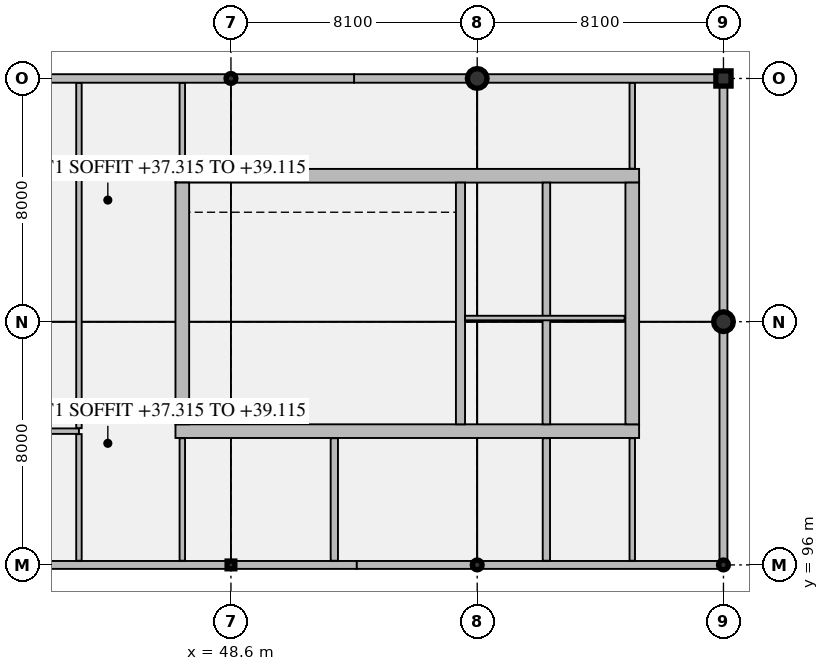
"""IFC4 building model, lengths in metres.
Left out: names, types, materials, properties, quantities, classifications, styles, units other than length and angle.
Written with IfcOpenShell. Run it as: python <this file> out.ifc"""

import sys

from ifc_helpers import new_model, si_unit, direction, frame, frame_2d, origin, origin_2d, place, context, subcontext, project, spatial, rectangle, hollow_rectangle, circle, hollow_circle, extrude, element, fill, save


model = new_model("IFC4")
c1 = context("Model", 3, precision=1e-05, world=origin(), true_north=direction((0.0, 1.0)))
c2 = subcontext(c1, "Body", "Model", "MODEL_VIEW")
j1 = project(units=[si_unit("LENGTHUNIT", "METRE"), si_unit("PLANEANGLEUNIT", "RADIAN")], contexts=[c1])
p1 = place(None, origin())
s1 = spatial("IfcSite", under=j1, at=p1, CompositionType="ELEMENT")
p2 = place(p1, origin())
s2 = spatial("IfcBuilding", under=s1, at=p2, CompositionType="ELEMENT")
p3 = place(p2, frame((0.0, 0.0, 33.3)))
s3 = spatial("IfcBuildingStorey", under=s2, at=p3, CompositionType="ELEMENT", Elevation=33.3)
p4 = place(p3, frame((46.775, 100.4, 0.0), z_axis=(0.0, 0.0, 1.0), x_axis=(1.0, 0.0, 0.0)))
e1 = element("IfcWall", 1, at=p4, inside=s3, PredefinedType="SHEAR", context=c2, shape_type="SweptSolid", body=[
    extrude(rectangle(XDim=15.25, YDim=0.45, at=frame_2d((7.625, 0.0))), origin(), (0.0, 0.0, 1.0), 3.98),
])
p5 = place(p4, frame((0.975, 0.0, 0.0)))
e2 = element("IfcOpeningElement", 2, at=p5, cuts=e1, PredefinedType="OPENING", context=c2, shape_type="SweptSolid", body=[
    extrude(rectangle(XDim=1.15, YDim=2.25, at=frame_2d((0.575, 1.125))), frame((0.0, 0.235, 0.0), z_axis=(0.0, -1.0, 0.0), x_axis=(1.0, 0.0, 0.0)), (0.0, 0.0, 1.0), 0.47),
])
p6 = place(p4, frame((10.258, 0.0, 0.0)))
e3 = element("IfcOpeningElement", 3, at=p6, cuts=e1, PredefinedType="OPENING", context=c2, shape_type="SweptSolid", body=[
    extrude(rectangle(XDim=1.1, YDim=2.2, at=frame_2d((0.55, 1.1))), frame((0.0, 0.235, 0.0), z_axis=(0.0, -1.0, 0.0), x_axis=(1.0, 0.0, 0.0)), (0.0, 0.0, 1.0), 0.47),
])
p7 = place(p3, frame((46.775, 108.8, 0.0), z_axis=(0.0, 0.0, 1.0), x_axis=(1.0, 0.0, 0.0)))
e4 = element("IfcWall", 4, at=p7, inside=s3, PredefinedType="SHEAR", context=c2, shape_type="SweptSolid", body=[
    extrude(rectangle(XDim=15.25, YDim=0.45, at=frame_2d((7.625, 0.0))), origin(), (0.0, 0.0, 1.0), 3.98),
])
for number, where, z_axis, x_axis in (
    (5, (47.0, 100.625, 0.0), (0.0, 0.0, 1.0), (0.0, 1.0, 0.0)),
    (6, (61.8, 100.625, 0.0), (0.0, 0.0, 1.0), (0.0, 1.0, 0.0)),
):
    element("IfcWall", number, at=place(p3, frame(where, z_axis=z_axis, x_axis=x_axis)), inside=s3, PredefinedType="SHEAR", context=c2, shape_type="SweptSolid", body=[
        extrude(rectangle(XDim=7.95, YDim=0.45, at=frame_2d((3.975, 0.0))), origin(), (0.0, 0.0, 1.0), 3.98),
    ])
p8 = place(p3, frame((56.15, 100.625, 0.0), z_axis=(0.0, 0.0, 1.0), x_axis=(0.0, 1.0, 0.0)))
e7 = element("IfcWall", 7, at=p8, inside=s3, PredefinedType="SHEAR", context=c2, shape_type="SweptSolid", body=[
    extrude(rectangle(XDim=7.95, YDim=0.3, at=frame_2d((3.975, 0.0))), origin(), (0.0, 0.0, 1.0), 3.98),
])
p9 = place(p3, frame((58.975, 100.625, 0.0), z_axis=(0.0, 0.0, 1.0), x_axis=(0.0, 1.0, 0.0)))
e8 = element("IfcWall", 8, at=p9, inside=s3, PredefinedType="SHEAR", context=c2, shape_type="SweptSolid", body=[
    extrude(rectangle(XDim=7.95, YDim=0.25, at=frame_2d((3.975, 0.0))), origin(), (0.0, 0.0, 1.0), 3.98),
])
p10 = place(p3, frame((48.6, 96.0, 0.0), z_axis=(0.0, 0.0, 1.0), x_axis=(1.0, 0.0, 0.0)))
e9 = element("IfcColumn", 9, at=p10, inside=s3, PredefinedType="COLUMN", context=c2, shape_type="SweptSolid", body=[
    extrude(hollow_rectangle(XDim=0.254, YDim=0.254, WallThickness=0.013, InnerFilletRadius=0.013, OuterFilletRadius=0.025, at=origin_2d()), origin(), (0.0, 0.0, 1.0), 3.98),
])
for number, where, z_axis, x_axis in (
    (10, (48.6, 112.0, 0.0), (0.0, 0.0, 1.0), (1.0, 0.0, 0.0)),
    (11, (56.7, 96.0, 0.0), (0.0, 0.0, 1.0), (1.0, 0.0, 0.0)),
):
    element("IfcColumn", number, at=place(p3, frame(where, z_axis=z_axis, x_axis=x_axis)), inside=s3, PredefinedType="COLUMN", context=c2, shape_type="SweptSolid", body=[
        extrude(hollow_circle(Radius=0.162, WallThickness=0.013, at=origin_2d()), origin(), (0.0, 0.0, 1.0), 3.98),
    ])
p11 = place(p3, frame((56.7, 112.0, 0.0), z_axis=(0.0, 0.0, 1.0), x_axis=(1.0, 0.0, 0.0)))
e12 = element("IfcColumn", 12, at=p11, inside=s3, PredefinedType="COLUMN", context=c2, shape_type="SweptSolid", body=[
    extrude(circle(Radius=0.325, at=origin_2d()), origin(), (0.0, 0.0, 1.0), 3.98),
])
p12 = place(p3, frame((64.8, 96.0, 0.0), z_axis=(0.0, 0.0, 1.0), x_axis=(1.0, 0.0, 0.0)))
e13 = element("IfcColumn", 13, at=p12, inside=s3, PredefinedType="COLUMN", context=c2, shape_type="SweptSolid", body=[
    extrude(hollow_circle(Radius=0.162, WallThickness=0.013, at=origin_2d()), origin(), (0.0, 0.0, 1.0), 3.98),
])
p13 = place(p3, frame((64.8, 104.0, 0.0), z_axis=(0.0, 0.0, 1.0), x_axis=(1.0, 0.0, 0.0)))
e14 = element("IfcColumn", 14, at=p13, inside=s3, PredefinedType="COLUMN", context=c2, shape_type="SweptSolid", body=[
    extrude(circle(Radius=0.325, at=origin_2d()), origin(), (0.0, 0.0, 1.0), 3.98),
])
p14 = place(p3, frame((64.8, 112.0, 0.0), z_axis=(0.0, 0.0, 1.0), x_axis=(1.0, 0.0, 0.0)))
e15 = element("IfcColumn", 15, at=p14, inside=s3, PredefinedType="COLUMN", context=c2, shape_type="SweptSolid", body=[
    extrude(rectangle(XDim=0.5, YDim=0.5, at=origin_2d()), origin(), (0.0, 0.0, 1.0), 3.98),
])
p15 = place(p3, frame((40.68, 96.0, 0.0), z_axis=(0.0, 0.0, 1.0), x_axis=(1.0, 0.0, 0.0)))
e16 = element("IfcWall", 16, at=p15, inside=s3, PredefinedType="SOLIDWALL", context=c2, shape_type="SweptSolid", body=[
    extrude(rectangle(XDim=12.06, YDim=0.26, at=frame_2d((6.03, 0.0))), origin(), (0.0, 0.0, 1.0), 3.655),
])
p16 = place(p15, frame((3.6, 0.0, 0.95)))
e17 = element("IfcOpeningElement", 17, at=p16, cuts=e16, PredefinedType="OPENING", context=c2, shape_type="SweptSolid", body=[
    extrude(rectangle(XDim=1.2, YDim=1.8, at=frame_2d((0.6, 0.9))), frame((0.0, 0.14, 0.0), z_axis=(0.0, -1.0, 0.0), x_axis=(1.0, 0.0, 0.0)), (0.0, 0.0, 1.0), 0.28),
])
p17 = place(p3, frame((52.74, 96.0, 0.0), z_axis=(0.0, 0.0, 1.0), x_axis=(1.0, 0.0, 0.0)))
e18 = element("IfcWall", 18, at=p17, inside=s3, PredefinedType="SOLIDWALL", context=c2, shape_type="SweptSolid", body=[
    extrude(rectangle(XDim=12.06, YDim=0.26, at=frame_2d((6.03, 0.0))), origin(), (0.0, 0.0, 1.0), 3.655),
])
p18 = place(p3, frame((64.8, 96.0, 0.0), z_axis=(0.0, 0.0, 1.0), x_axis=(0.0, 1.0, 0.0)))
e19 = element("IfcWall", 19, at=p18, inside=s3, PredefinedType="SOLIDWALL", context=c2, shape_type="SweptSolid", body=[
    extrude(rectangle(XDim=16.0, YDim=0.26, at=frame_2d((8.0, 0.0))), origin(), (0.0, 0.0, 1.0), 3.655),
])
p19 = place(p18, frame((11.25, 0.0, 0.0)))
e20 = element("IfcOpeningElement", 20, at=p19, cuts=e19, PredefinedType="OPENING", context=c2, shape_type="SweptSolid", body=[
    extrude(rectangle(XDim=1.5, YDim=2.3, at=frame_2d((0.75, 1.15))), frame((0.0, 0.14, 0.0), z_axis=(0.0, -1.0, 0.0), x_axis=(1.0, 0.0, 0.0)), (0.0, 0.0, 1.0), 0.28),
])
p20 = place(p3, frame((64.8, 112.0, 0.0), z_axis=(0.0, 0.0, 1.0), x_axis=(-1.0, 0.0, 0.0)))
e21 = element("IfcWall", 21, at=p20, inside=s3, PredefinedType="SOLIDWALL", context=c2, shape_type="SweptSolid", body=[
    extrude(rectangle(XDim=12.15, YDim=0.28, at=frame_2d((6.075, 0.0))), origin(), (0.0, 0.0, 1.0), 3.655),
])
p21 = place(p20, frame((5.4, 0.0, 0.95)))
e22 = element("IfcOpeningElement", 22, at=p21, cuts=e21, PredefinedType="OPENING", context=c2, shape_type="SweptSolid", body=[
    extrude(rectangle(XDim=1.35, YDim=1.8, at=frame_2d((0.675, 0.9))), frame((0.0, 0.15, 0.0), z_axis=(0.0, -1.0, 0.0), x_axis=(1.0, 0.0, 0.0)), (0.0, 0.0, 1.0), 0.3),
])
p22 = place(p3, frame((52.65, 112.0, 0.0), z_axis=(0.0, 0.0, 1.0), x_axis=(-1.0, 0.0, 0.0)))
e23 = element("IfcWall", 23, at=p22, inside=s3, PredefinedType="SOLIDWALL", context=c2, shape_type="SweptSolid", body=[
    extrude(rectangle(XDim=12.15, YDim=0.28, at=frame_2d((6.075, 0.0))), origin(), (0.0, 0.0, 1.0), 3.655),
])
p23 = place(p3, frame((56.3, 104.12, 0.0), z_axis=(0.0, 0.0, 1.0), x_axis=(1.0, 0.0, 0.0)))
e24 = element("IfcWall", 24, at=p23, inside=s3, PredefinedType="PARTITIONING", context=c2, shape_type="SweptSolid", body=[
    extrude(rectangle(XDim=5.25, YDim=0.15, at=frame_2d((2.625, 0.0))), origin(), (0.0, 0.0, 1.0), 3.98),
])
p24 = place(p3, frame((39.6, 100.4, 0.0), z_axis=(0.0, 0.0, 1.0), x_axis=(1.0, 0.0, 0.0)))
e25 = element("IfcWall", 25, at=p24, inside=s3, PredefinedType="PARTITIONING", context=c2, shape_type="SweptSolid", body=[
    extrude(rectangle(XDim=4.0, YDim=0.18, at=frame_2d((2.0, 0.0))), origin(), (0.0, 0.0, 1.0), 3.98),
])
p25 = place(p3, frame((43.6, 96.138, 0.0), z_axis=(0.0, 0.0, 1.0), x_axis=(0.0, 1.0, 0.0)))
e26 = element("IfcWall", 26, at=p25, inside=s3, PredefinedType="PARTITIONING", context=c2, shape_type="SweptSolid", body=[
    extrude(rectangle(XDim=4.164, YDim=0.18, at=frame_2d((2.082, 0.0))), origin(), (0.0, 0.0, 1.0), 3.98),
])
p26 = place(p25, frame((1.532, 0.0, 0.0)))
e27 = element("IfcOpeningElement", 27, at=p26, cuts=e26, PredefinedType="OPENING", context=c2, shape_type="SweptSolid", body=[
    extrude(rectangle(XDim=1.1, YDim=2.2, at=frame_2d((0.55, 1.1))), frame((0.0, 0.1, 0.0), z_axis=(0.0, -1.0, 0.0), x_axis=(1.0, 0.0, 0.0)), (0.0, 0.0, 1.0), 0.2),
])
p27 = place(p3, frame((43.6, 100.498, 0.0), z_axis=(0.0, 0.0, 1.0), x_axis=(0.0, 1.0, 0.0)))
e28 = element("IfcWall", 28, at=p27, inside=s3, PredefinedType="PARTITIONING", context=c2, shape_type="SweptSolid", body=[
    extrude(rectangle(XDim=11.354, YDim=0.18, at=frame_2d((5.677, 0.0))), origin(), (0.0, 0.0, 1.0), 3.98),
])
p28 = place(p27, frame((5.127, 0.0, 0.0)))
e29 = element("IfcOpeningElement", 29, at=p28, cuts=e28, PredefinedType="OPENING", context=c2, shape_type="SweptSolid", body=[
    extrude(rectangle(XDim=1.1, YDim=2.2, at=frame_2d((0.55, 1.1))), frame((0.0, 0.1, 0.0), z_axis=(0.0, -1.0, 0.0), x_axis=(1.0, 0.0, 0.0)), (0.0, 0.0, 1.0), 0.2),
])
p29 = place(p3, frame((47.0, 96.138, 0.0), z_axis=(0.0, 0.0, 1.0), x_axis=(0.0, 1.0, 0.0)))
e30 = element("IfcWall", 30, at=p29, inside=s3, PredefinedType="PARTITIONING", context=c2, shape_type="SweptSolid", body=[
    extrude(rectangle(XDim=4.029, YDim=0.18, at=frame_2d((2.015, 0.0))), origin(), (0.0, 0.0, 1.0), 3.98),
])
p30 = place(p29, frame((1.465, 0.0, 0.0)))
e31 = element("IfcOpeningElement", 31, at=p30, cuts=e30, PredefinedType="OPENING", context=c2, shape_type="SweptSolid", body=[
    extrude(rectangle(XDim=1.1, YDim=2.2, at=frame_2d((0.55, 1.1))), frame((0.0, 0.1, 0.0), z_axis=(0.0, -1.0, 0.0), x_axis=(1.0, 0.0, 0.0)), (0.0, 0.0, 1.0), 0.2),
])
p31 = place(p3, frame((47.0, 109.033, 0.0), z_axis=(0.0, 0.0, 1.0), x_axis=(0.0, 1.0, 0.0)))
e32 = element("IfcWall", 32, at=p31, inside=s3, PredefinedType="PARTITIONING", context=c2, shape_type="SweptSolid", body=[
    extrude(rectangle(XDim=2.819, YDim=0.18, at=frame_2d((1.41, 0.0))), origin(), (0.0, 0.0, 1.0), 3.98),
])
p32 = place(p31, frame((0.86, 0.0, 0.0)))
e33 = element("IfcOpeningElement", 33, at=p32, cuts=e32, PredefinedType="OPENING", context=c2, shape_type="SweptSolid", body=[
    extrude(rectangle(XDim=1.1, YDim=2.2, at=frame_2d((0.55, 1.1))), frame((0.0, 0.1, 0.0), z_axis=(0.0, -1.0, 0.0), x_axis=(1.0, 0.0, 0.0)), (0.0, 0.0, 1.0), 0.2),
])
p33 = place(p3, frame((52.0, 96.138, 0.0), z_axis=(0.0, 0.0, 1.0), x_axis=(0.0, 1.0, 0.0)))
e34 = element("IfcWall", 34, at=p33, inside=s3, PredefinedType="PARTITIONING", context=c2, shape_type="SweptSolid", body=[
    extrude(rectangle(XDim=4.029, YDim=0.24, at=frame_2d((2.015, 0.0))), origin(), (0.0, 0.0, 1.0), 3.98),
])
p34 = place(p33, frame((1.415, 0.0, 0.0)))
e35 = element("IfcOpeningElement", 35, at=p34, cuts=e34, PredefinedType="OPENING", context=c2, shape_type="SweptSolid", body=[
    extrude(rectangle(XDim=1.2, YDim=2.3, at=frame_2d((0.6, 1.15))), frame((0.0, 0.13, 0.0), z_axis=(0.0, -1.0, 0.0), x_axis=(1.0, 0.0, 0.0)), (0.0, 0.0, 1.0), 0.26),
])
p35 = place(p3, frame((58.975, 96.138, 0.0), z_axis=(0.0, 0.0, 1.0), x_axis=(0.0, 1.0, 0.0)))
e36 = element("IfcWall", 36, at=p35, inside=s3, PredefinedType="PARTITIONING", context=c2, shape_type="SweptSolid", body=[
    extrude(rectangle(XDim=4.029, YDim=0.24, at=frame_2d((2.015, 0.0))), origin(), (0.0, 0.0, 1.0), 3.98),
])
p36 = place(p3, frame((61.8, 96.138, 0.0), z_axis=(0.0, 0.0, 1.0), x_axis=(0.0, 1.0, 0.0)))
e37 = element("IfcWall", 37, at=p36, inside=s3, PredefinedType="PARTITIONING", context=c2, shape_type="SweptSolid", body=[
    extrude(rectangle(XDim=4.029, YDim=0.18, at=frame_2d((2.015, 0.0))), origin(), (0.0, 0.0, 1.0), 3.98),
])
p37 = place(p36, frame((1.514, 0.0, 0.0)))
e38 = element("IfcOpeningElement", 38, at=p37, cuts=e37, PredefinedType="OPENING", context=c2, shape_type="SweptSolid", body=[
    extrude(rectangle(XDim=1.0, YDim=2.15, at=frame_2d((0.5, 1.075))), frame((0.0, 0.1, 0.0), z_axis=(0.0, -1.0, 0.0), x_axis=(1.0, 0.0, 0.0)), (0.0, 0.0, 1.0), 0.2),
])
p38 = place(p3, frame((61.8, 109.033, 0.0), z_axis=(0.0, 0.0, 1.0), x_axis=(0.0, 1.0, 0.0)))
e39 = element("IfcWall", 39, at=p38, inside=s3, PredefinedType="PARTITIONING", context=c2, shape_type="SweptSolid", body=[
    extrude(rectangle(XDim=2.819, YDim=0.18, at=frame_2d((1.41, 0.0))), origin(), (0.0, 0.0, 1.0), 3.98),
])
p39 = place(p38, frame((0.86, 0.0, 0.0)))
e40 = element("IfcOpeningElement", 40, at=p39, cuts=e39, PredefinedType="OPENING", context=c2, shape_type="SweptSolid", body=[
    extrude(rectangle(XDim=1.1, YDim=2.2, at=frame_2d((0.55, 1.1))), frame((0.0, 0.1, 0.0), z_axis=(0.0, -1.0, 0.0), x_axis=(1.0, 0.0, 0.0)), (0.0, 0.0, 1.0), 0.2),
])
p40 = place(p16, origin())
e41 = element("IfcWindow", 41, at=p40, inside=s3, PartitioningType="SINGLE_PANEL", PredefinedType="WINDOW", context=c2, shape_type="SweptSolid", body=[
    extrude(rectangle(XDim=1.2, YDim=1.8, at=frame_2d((0.6, 0.9))), frame((0.0, 0.03, 0.0), z_axis=(0.0, -1.0, 0.0), x_axis=(1.0, 0.0, 0.0)), (0.0, 0.0, 1.0), 0.06),
])
fill(e17, e41)
p41 = place(p19, frame((1.5, 0.0, 0.0), z_axis=(0.0, 0.0, 1.0), x_axis=(-1.0, 0.0, 0.0)))
e42 = element("IfcDoor", 42, at=p41, inside=s3, OperationType="DOUBLE_DOOR_SINGLE_SWING", PredefinedType="DOOR", context=c2, shape_type="SweptSolid", body=[
    extrude(rectangle(XDim=1.5, YDim=2.3, at=frame_2d((0.75, 1.15))), frame((0.0, 0.025, 0.0), z_axis=(0.0, -1.0, 0.0), x_axis=(1.0, 0.0, 0.0)), (0.0, 0.0, 1.0), 0.05),
])
fill(e20, e42)
p42 = place(p21, origin())
e43 = element("IfcWindow", 43, at=p42, inside=s3, PartitioningType="DOUBLE_PANEL_VERTICAL", PredefinedType="WINDOW", context=c2, shape_type="SweptSolid", body=[
    extrude(rectangle(XDim=1.35, YDim=1.8, at=frame_2d((0.675, 0.9))), frame((0.0, 0.03, 0.0), z_axis=(0.0, -1.0, 0.0), x_axis=(1.0, 0.0, 0.0)), (0.0, 0.0, 1.0), 0.06),
])
fill(e22, e43)
p43 = place(p5, origin())
e44 = element("IfcDoor", 44, at=p43, inside=s3, OperationType="SINGLE_SWING_LEFT", PredefinedType="DOOR", context=c2, shape_type="SweptSolid", body=[
    extrude(rectangle(XDim=1.15, YDim=2.25, at=frame_2d((0.575, 1.125))), frame((0.0, 0.025, 0.0), z_axis=(0.0, -1.0, 0.0), x_axis=(1.0, 0.0, 0.0)), (0.0, 0.0, 1.0), 0.05),
])
fill(e2, e44)
p44 = place(p6, frame((1.1, 0.0, 0.0), z_axis=(0.0, 0.0, 1.0), x_axis=(-1.0, 0.0, 0.0)))
e45 = element("IfcDoor", 45, at=p44, inside=s3, OperationType="DOUBLE_DOOR_SLIDING", PredefinedType="DOOR", context=c2, shape_type="SweptSolid", body=[
    extrude(rectangle(XDim=1.1, YDim=2.2, at=frame_2d((0.55, 1.1))), frame((0.0, 0.025, 0.0), z_axis=(0.0, -1.0, 0.0), x_axis=(1.0, 0.0, 0.0)), (0.0, 0.0, 1.0), 0.05),
])
fill(e3, e45)
p45 = place(p26, origin())
e46 = element("IfcDoor", 46, at=p45, inside=s3, OperationType="SINGLE_SWING_RIGHT", PredefinedType="DOOR", context=c2, shape_type="SweptSolid", body=[
    extrude(rectangle(XDim=1.1, YDim=2.2, at=frame_2d((0.55, 1.1))), frame((0.0, 0.025, 0.0), z_axis=(0.0, -1.0, 0.0), x_axis=(1.0, 0.0, 0.0)), (0.0, 0.0, 1.0), 0.05),
])
fill(e27, e46)
p46 = place(p28, origin())
e47 = element("IfcDoor", 47, at=p46, inside=s3, OperationType="SINGLE_SWING_LEFT", PredefinedType="DOOR", context=c2, shape_type="SweptSolid", body=[
    extrude(rectangle(XDim=1.1, YDim=2.2, at=frame_2d((0.55, 1.1))), frame((0.0, 0.025, 0.0), z_axis=(0.0, -1.0, 0.0), x_axis=(1.0, 0.0, 0.0)), (0.0, 0.0, 1.0), 0.05),
])
fill(e29, e47)
p47 = place(p30, origin())
e48 = element("IfcDoor", 48, at=p47, inside=s3, OperationType="SINGLE_SWING_RIGHT", PredefinedType="DOOR", context=c2, shape_type="SweptSolid", body=[
    extrude(rectangle(XDim=1.1, YDim=2.2, at=frame_2d((0.55, 1.1))), frame((0.0, 0.025, 0.0), z_axis=(0.0, -1.0, 0.0), x_axis=(1.0, 0.0, 0.0)), (0.0, 0.0, 1.0), 0.05),
])
fill(e31, e48)
p48 = place(p32, frame((1.1, 0.0, 0.0), z_axis=(0.0, 0.0, 1.0), x_axis=(-1.0, 0.0, 0.0)))
e49 = element("IfcDoor", 49, at=p48, inside=s3, OperationType="SINGLE_SWING_LEFT", PredefinedType="DOOR", context=c2, shape_type="SweptSolid", body=[
    extrude(rectangle(XDim=1.1, YDim=2.2, at=frame_2d((0.55, 1.1))), frame((0.0, 0.025, 0.0), z_axis=(0.0, -1.0, 0.0), x_axis=(1.0, 0.0, 0.0)), (0.0, 0.0, 1.0), 0.05),
])
fill(e33, e49)
p49 = place(p34, origin())
e50 = element("IfcDoor", 50, at=p49, inside=s3, OperationType="SINGLE_SWING_RIGHT", PredefinedType="DOOR", context=c2, shape_type="SweptSolid", body=[
    extrude(rectangle(XDim=1.2, YDim=2.3, at=frame_2d((0.6, 1.15))), frame((0.0, 0.025, 0.0), z_axis=(0.0, -1.0, 0.0), x_axis=(1.0, 0.0, 0.0)), (0.0, 0.0, 1.0), 0.05),
])
fill(e35, e50)
p50 = place(p37, origin())
e51 = element("IfcDoor", 51, at=p50, inside=s3, OperationType="SINGLE_SWING_LEFT", PredefinedType="DOOR", context=c2, shape_type="SweptSolid", body=[
    extrude(rectangle(XDim=1.0, YDim=2.15, at=frame_2d((0.5, 1.075))), frame((0.0, 0.025, 0.0), z_axis=(0.0, -1.0, 0.0), x_axis=(1.0, 0.0, 0.0)), (0.0, 0.0, 1.0), 0.05),
])
fill(e38, e51)
p51 = place(p39, frame((1.1, 0.0, 0.0), z_axis=(0.0, 0.0, 1.0), x_axis=(-1.0, 0.0, 0.0)))
e52 = element("IfcDoor", 52, at=p51, inside=s3, OperationType="SINGLE_SWING_RIGHT", PredefinedType="DOOR", context=c2, shape_type="SweptSolid", body=[
    extrude(rectangle(XDim=1.1, YDim=2.2, at=frame_2d((0.55, 1.1))), frame((0.0, 0.025, 0.0), z_axis=(0.0, -1.0, 0.0), x_axis=(1.0, 0.0, 0.0)), (0.0, 0.0, 1.0), 0.05),
])
fill(e40, e52)
save(model, sys.argv[1])
